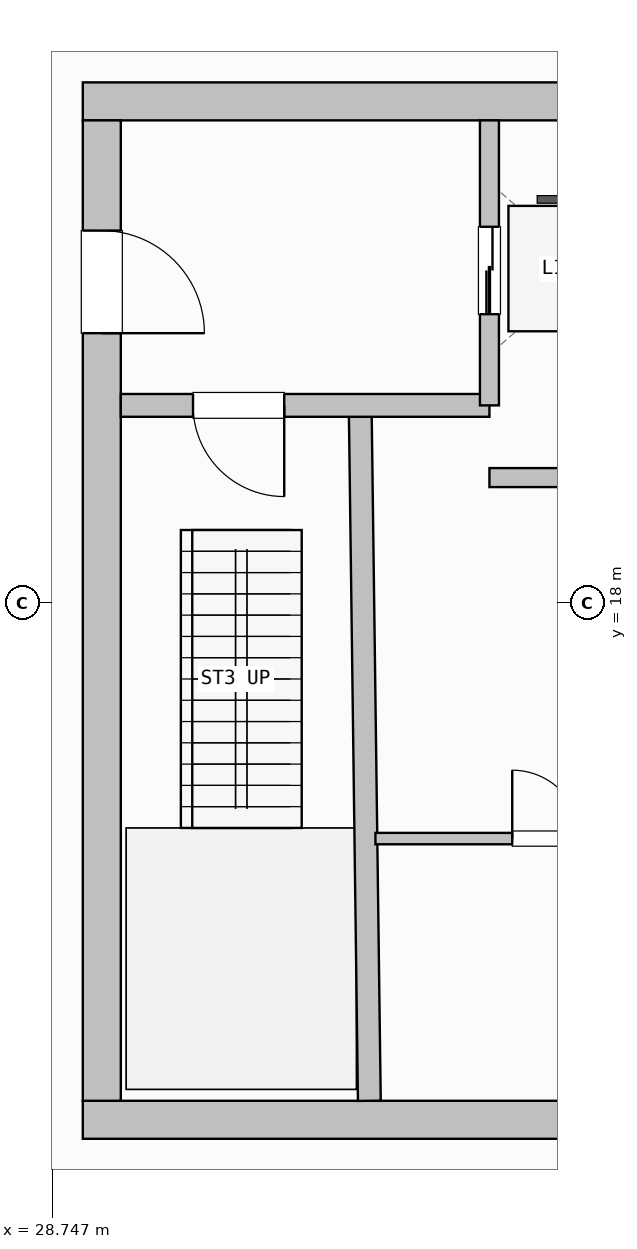
"""IFC4 building model, lengths in metres.
Left out: names, types, materials, properties, quantities, classifications, styles, units other than length and angle.
Written with IfcOpenShell. Run it as: python <this file> out.ifc"""

import sys

from ifc_helpers import new_model, si_unit, direction, frame, frame_2d, origin, place, context, subcontext, project, spatial, rectangle, extrude, element, fill, save


model = new_model("IFC4")
c1 = context("Model", 3, precision=1e-05, world=origin(), true_north=direction((0.0, 1.0)))
c2 = subcontext(c1, "Body", "Model", "MODEL_VIEW")
j1 = project(units=[si_unit("LENGTHUNIT", "METRE"), si_unit("PLANEANGLEUNIT", "RADIAN")], contexts=[c1])
p1 = place(None, origin())
s1 = spatial("IfcSite", under=j1, at=p1, CompositionType="ELEMENT")
p2 = place(p1, origin())
s2 = spatial("IfcBuilding", under=s1, at=p2, CompositionType="ELEMENT")
p3 = place(p2, frame((0.0, 0.0, 201.2)))
s3 = spatial("IfcBuildingStorey", under=s2, at=p3, CompositionType="ELEMENT", Elevation=201.2)
p4 = place(p3, frame((29.15, 11.2, 0.0), z_axis=(0.0, 0.0, 1.0), x_axis=(1.0, 0.0, 0.0)))
e1 = element("IfcWall", 1, at=p4, inside=s3, PredefinedType="SHEAR", context=c2, shape_type="SweptSolid", body=[
    extrude(rectangle(XDim=13.9, YDim=0.5, at=frame_2d((6.95, 0.0))), origin(), (0.0, 0.0, 1.0), 4.72),
])
p5 = place(p3, frame((43.05, 24.6, 0.0), z_axis=(0.0, 0.0, 1.0), x_axis=(-1.0, 0.0, 0.0)))
e2 = element("IfcWall", 2, at=p5, inside=s3, PredefinedType="SHEAR", context=c2, shape_type="SweptSolid", body=[
    extrude(rectangle(XDim=13.9, YDim=0.5, at=frame_2d((6.95, 0.0))), origin(), (0.0, 0.0, 1.0), 4.72),
])
p6 = place(p5, frame((0.75, 0.0, 0.0)))
e3 = element("IfcOpeningElement", 3, at=p6, cuts=e2, PredefinedType="OPENING", context=c2, shape_type="SweptSolid", body=[
    extrude(rectangle(XDim=1.1, YDim=2.15, at=frame_2d((0.55, 1.075))), frame((0.0, 0.26, 0.0), z_axis=(0.0, -1.0, 0.0), x_axis=(1.0, 0.0, 0.0)), (0.0, 0.0, 1.0), 0.52),
])
p7 = place(p5, frame((2.7, 0.0, 0.0)))
e4 = element("IfcOpeningElement", 4, at=p7, cuts=e2, PredefinedType="OPENING", context=c2, shape_type="SweptSolid", body=[
    extrude(rectangle(XDim=0.9, YDim=2.1, at=frame_2d((0.45, 1.05))), frame((0.0, 0.26, 0.0), z_axis=(0.0, -1.0, 0.0), x_axis=(1.0, 0.0, 0.0)), (0.0, 0.0, 1.0), 0.52),
])
p8 = place(p5, frame((4.6, 0.0, 0.0)))
e5 = element("IfcOpeningElement", 5, at=p8, cuts=e2, PredefinedType="OPENING", context=c2, shape_type="SweptSolid", body=[
    extrude(rectangle(XDim=0.9, YDim=2.1, at=frame_2d((0.45, 1.05))), frame((0.0, 0.26, 0.0), z_axis=(0.0, -1.0, 0.0), x_axis=(1.0, 0.0, 0.0)), (0.0, 0.0, 1.0), 0.52),
])
p9 = place(p3, frame((29.4, 24.35, 0.0), z_axis=(0.0, 0.0, 1.0), x_axis=(0.0, -1.0, 0.0)))
e6 = element("IfcWall", 6, at=p9, inside=s3, PredefinedType="SHEAR", context=c2, shape_type="SweptSolid", body=[
    extrude(rectangle(XDim=12.9, YDim=0.5, at=frame_2d((6.45, 0.0))), origin(), (0.0, 0.0, 1.0), 4.72),
])
p10 = place(p9, frame((1.45, 0.0, 0.0)))
e7 = element("IfcOpeningElement", 7, at=p10, cuts=e6, PredefinedType="OPENING", context=c2, shape_type="SweptSolid", body=[
    extrude(rectangle(XDim=1.35, YDim=2.15, at=frame_2d((0.675, 1.075))), frame((0.0, 0.26, 0.0), z_axis=(0.0, -1.0, 0.0), x_axis=(1.0, 0.0, 0.0)), (0.0, 0.0, 1.0), 0.52),
])
p11 = place(p3, frame((32.92, 11.45, 0.0), z_axis=(0.0, 0.0, 1.0), x_axis=(-0.013171578211, 0.999913251001, 0.0)))
e8 = element("IfcWall", 8, at=p11, inside=s3, PredefinedType="SHEAR", context=c2, shape_type="SweptSolid", body=[
    extrude(rectangle(XDim=9.101, YDim=0.3, at=frame_2d((4.55, 0.0))), origin(), (0.0, 0.0, 1.0), 4.72),
])
p12 = place(p3, frame((34.5, 20.6, 0.0), z_axis=(0.0, 0.0, 1.0), x_axis=(-1.0, 0.0, 0.0)))
e9 = element("IfcWall", 9, at=p12, inside=s3, PredefinedType="SHEAR", context=c2, shape_type="SweptSolid", body=[
    extrude(rectangle(XDim=4.85, YDim=0.3, at=frame_2d((2.425, 0.0))), origin(), (0.0, 0.0, 1.0), 4.72),
])
p13 = place(p12, frame((2.7, 0.0, 0.0)))
e10 = element("IfcOpeningElement", 10, at=p13, cuts=e9, PredefinedType="OPENING", context=c2, shape_type="SweptSolid", body=[
    extrude(rectangle(XDim=1.2, YDim=2.15, at=frame_2d((0.6, 1.075))), frame((0.0, 0.16, 0.0), z_axis=(0.0, -1.0, 0.0), x_axis=(1.0, 0.0, 0.0)), (0.0, 0.0, 1.0), 0.32),
])
p14 = place(p3, frame((34.5, 20.6, 0.0), z_axis=(0.0, 0.0, 1.0), x_axis=(0.0, 1.0, 0.0)))
e11 = element("IfcWall", 11, at=p14, inside=s3, PredefinedType="PARTITIONING", context=c2, shape_type="SweptSolid", body=[
    extrude(rectangle(XDim=3.75, YDim=0.25, at=frame_2d((1.875, 0.0))), origin(), (0.0, 0.0, 1.0), 4.72),
])
p15 = place(p14, frame((1.2, 0.0, 0.0)))
e12 = element("IfcOpeningElement", 12, at=p15, cuts=e11, PredefinedType="OPENING", context=c2, shape_type="SweptSolid", body=[
    extrude(rectangle(XDim=1.15, YDim=2.15, at=frame_2d((0.575, 1.075))), frame((0.0, 0.135, 0.0), z_axis=(0.0, -1.0, 0.0), x_axis=(1.0, 0.0, 0.0)), (0.0, 0.0, 1.0), 0.27),
])
p16 = place(p3, frame((34.5, 19.65, 0.0), z_axis=(0.0, 0.0, 1.0), x_axis=(1.0, 0.0, 0.0)))
e13 = element("IfcWall", 13, at=p16, inside=s3, PredefinedType="PARTITIONING", context=c2, shape_type="SweptSolid", body=[
    extrude(rectangle(XDim=6.48, YDim=0.25, at=frame_2d((3.24, 0.0))), origin(), (0.0, 0.0, 1.0), 4.72),
])
p17 = place(p3, frame((33.0, 14.9, 0.0), z_axis=(0.0, 0.0, 1.0), x_axis=(1.0, 0.0, 0.0)))
e14 = element("IfcWall", 14, at=p17, inside=s3, PredefinedType="PARTITIONING", context=c2, shape_type="SweptSolid", body=[
    extrude(rectangle(XDim=5.1, YDim=0.15, at=frame_2d((2.55, 0.0))), origin(), (0.0, 0.0, 1.0), 4.72),
])
p18 = place(p17, frame((1.8, 0.0, 0.0)))
e15 = element("IfcOpeningElement", 15, at=p18, cuts=e14, PredefinedType="OPENING", context=c2, shape_type="SweptSolid", body=[
    extrude(rectangle(XDim=0.9, YDim=2.1, at=frame_2d((0.45, 1.05))), frame((0.0, 0.085, 0.0), z_axis=(0.0, -1.0, 0.0), x_axis=(1.0, 0.0, 0.0)), (0.0, 0.0, 1.0), 0.17),
])
p19 = place(p13, origin())
e16 = element("IfcDoor", 16, at=p19, inside=s3, OperationType="SINGLE_SWING_LEFT", PredefinedType="DOOR", context=c2, shape_type="SweptSolid", body=[
    extrude(rectangle(XDim=1.2, YDim=2.15, at=frame_2d((0.6, 1.075))), frame((0.0, 0.025, 0.0), z_axis=(0.0, -1.0, 0.0), x_axis=(1.0, 0.0, 0.0)), (0.0, 0.0, 1.0), 0.05),
])
fill(e10, e16)
p20 = place(p10, origin())
e17 = element("IfcDoor", 17, at=p20, inside=s3, OperationType="SINGLE_SWING_RIGHT", PredefinedType="DOOR", context=c2, shape_type="SweptSolid", body=[
    extrude(rectangle(XDim=1.35, YDim=2.15, at=frame_2d((0.675, 1.075))), frame((0.0, 0.025, 0.0), z_axis=(0.0, -1.0, 0.0), x_axis=(1.0, 0.0, 0.0)), (0.0, 0.0, 1.0), 0.05),
])
fill(e7, e17)
p21 = place(p15, origin())
e18 = element("IfcDoor", 18, at=p21, inside=s3, OperationType="DOUBLE_DOOR_SLIDING", PredefinedType="DOOR", context=c2, shape_type="SweptSolid", body=[
    extrude(rectangle(XDim=1.15, YDim=2.15, at=frame_2d((0.575, 1.075))), frame((0.0, 0.025, 0.0), z_axis=(0.0, -1.0, 0.0), x_axis=(1.0, 0.0, 0.0)), (0.0, 0.0, 1.0), 0.05),
])
fill(e12, e18)
p22 = place(p18, origin())
e19 = element("IfcDoor", 19, at=p22, inside=s3, OperationType="SINGLE_SWING_LEFT", PredefinedType="DOOR", context=c2, shape_type="SweptSolid", body=[
    extrude(rectangle(XDim=0.9, YDim=2.1, at=frame_2d((0.45, 1.05))), frame((0.0, 0.025, 0.0), z_axis=(0.0, -1.0, 0.0), x_axis=(1.0, 0.0, 0.0)), (0.0, 0.0, 1.0), 0.05),
])
fill(e15, e19)
save(model, sys.argv[1])
